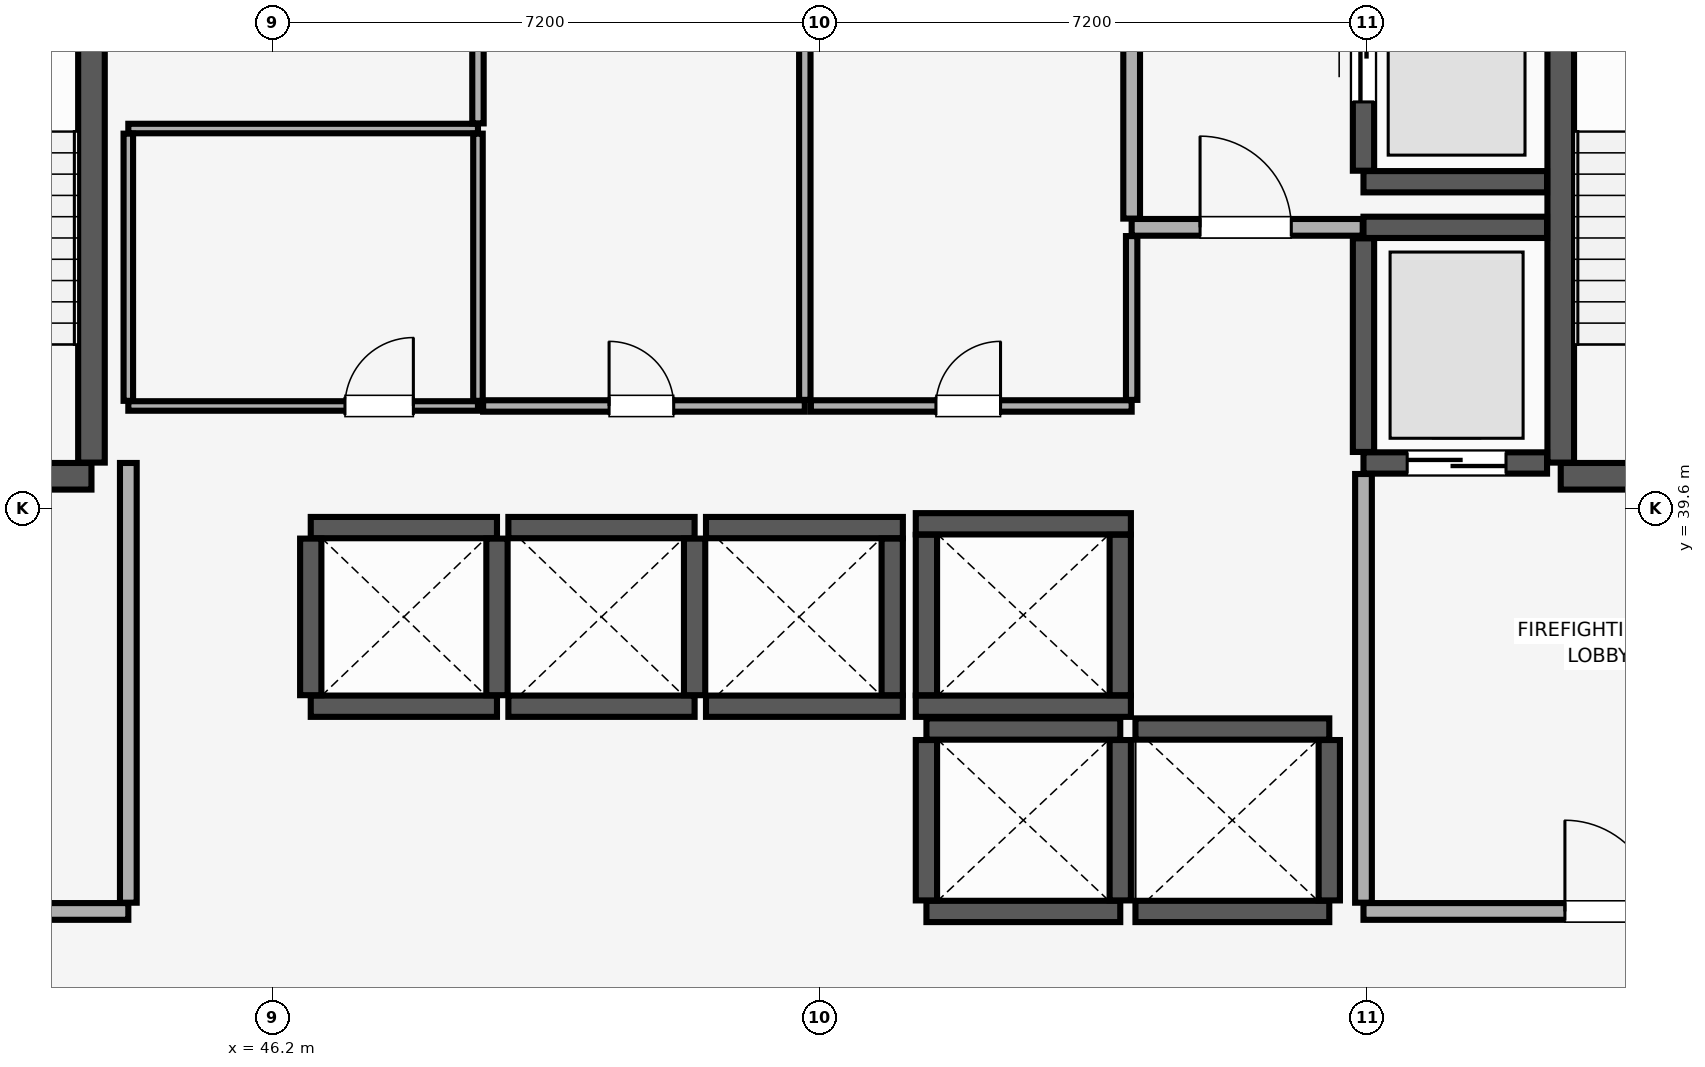
"""IFC4 building model, lengths in metres.
Left out: names, types, materials, properties, quantities, classifications, styles, units other than length and angle.
Written with IfcOpenShell. Run it as: python <this file> out.ifc"""

import sys

from ifc_helpers import new_model, si_unit, direction, frame, frame_2d, origin, place, context, subcontext, project, spatial, rectangle, extrude, element, fill, save


model = new_model("IFC4")
c1 = context("Model", 3, precision=1e-05, world=origin(), true_north=direction((0.0, 1.0)))
c2 = subcontext(c1, "Body", "Model", "MODEL_VIEW")
j1 = project(units=[si_unit("LENGTHUNIT", "METRE"), si_unit("PLANEANGLEUNIT", "RADIAN")], contexts=[c1])
p1 = place(None, origin())
s1 = spatial("IfcSite", under=j1, at=p1, CompositionType="ELEMENT")
p2 = place(p1, origin())
s2 = spatial("IfcBuilding", under=s1, at=p2, CompositionType="ELEMENT")
p3 = place(p2, frame((0.0, 0.0, 76.4)))
s3 = spatial("IfcBuildingStorey", under=s2, at=p3, CompositionType="ELEMENT", Elevation=76.4)
p4 = place(p3, frame((40.185, 40.025, 0.0), z_axis=(0.0, 0.0, 1.0), x_axis=(1.0, 0.0, 0.0)))
e1 = element("IfcWall", 1, at=p4, inside=s3, PredefinedType="SHEAR", context=c2, shape_type="SweptSolid", body=[
    extrude(rectangle(XDim=3.63, YDim=0.35, at=frame_2d((1.815, 0.0))), origin(), (0.0, 0.0, 1.0), 3.4),
])
p5 = place(p4, frame((1.24, 0.0, 0.0)))
e2 = element("IfcOpeningElement", 2, at=p5, cuts=e1, PredefinedType="OPENING", context=c2, shape_type="SweptSolid", body=[
    extrude(rectangle(XDim=1.15, YDim=2.15, at=frame_2d((0.575, 1.075))), frame((0.0, 0.185, 0.0), z_axis=(0.0, -1.0, 0.0), x_axis=(1.0, 0.0, 0.0)), (0.0, 0.0, 1.0), 0.37),
])
p6 = place(p3, frame((43.815, 40.205, 0.0), z_axis=(0.0, 0.0, 1.0), x_axis=(0.0, 1.0, 0.0)))
e3 = element("IfcWall", 3, at=p6, inside=s3, PredefinedType="SHEAR", context=c2, shape_type="SweptSolid", body=[
    extrude(rectangle(XDim=8.09, YDim=0.35, at=frame_2d((4.045, 0.0))), origin(), (0.0, 0.0, 1.0), 3.4),
])
p7 = place(p3, frame((63.145, 40.025, 0.0), z_axis=(0.0, 0.0, 1.0), x_axis=(1.0, 0.0, 0.0)))
e4 = element("IfcWall", 4, at=p7, inside=s3, PredefinedType="SHEAR", context=c2, shape_type="SweptSolid", body=[
    extrude(rectangle(XDim=4.1, YDim=0.35, at=frame_2d((2.05, 0.0))), origin(), (0.0, 0.0, 1.0), 3.4),
])
p8 = place(p7, frame((1.24, 0.0, 0.0)))
e5 = element("IfcOpeningElement", 5, at=p8, cuts=e4, PredefinedType="OPENING", context=c2, shape_type="SweptSolid", body=[
    extrude(rectangle(XDim=1.15, YDim=2.15, at=frame_2d((0.575, 1.075))), frame((0.0, 0.185, 0.0), z_axis=(0.0, -1.0, 0.0), x_axis=(1.0, 0.0, 0.0)), (0.0, 0.0, 1.0), 0.37),
])
p9 = place(p3, frame((63.145, 40.205, 0.0), z_axis=(0.0, 0.0, 1.0), x_axis=(0.0, 1.0, 0.0)))
e6 = element("IfcWall", 6, at=p9, inside=s3, PredefinedType="SHEAR", context=c2, shape_type="SweptSolid", body=[
    extrude(rectangle(XDim=8.09, YDim=0.35, at=frame_2d((4.045, 0.0))), origin(), (0.0, 0.0, 1.0), 3.4),
])
for number, where, z_axis, x_axis in (
    (7, (46.7, 37.0, 0.0), (0.0, 0.0, 1.0), (1.0, 0.0, 0.0)),
    (8, (46.7, 39.35, 0.0), (0.0, 0.0, 1.0), (1.0, 0.0, 0.0)),
):
    element("IfcWall", number, at=place(p3, frame(where, z_axis=z_axis, x_axis=x_axis)), inside=s3, PredefinedType="SHEAR", context=c2, shape_type="SweptSolid", body=[
        extrude(rectangle(XDim=2.45, YDim=0.28, at=frame_2d((1.225, 0.0))), origin(), (0.0, 0.0, 1.0), 3.4),
    ])
for number, where, z_axis, x_axis in (
    (9, (46.7, 37.145, 0.0), (0.0, 0.0, 1.0), (0.0, 1.0, 0.0)),
    (10, (49.15, 37.145, 0.0), (0.0, 0.0, 1.0), (0.0, 1.0, 0.0)),
):
    element("IfcWall", number, at=place(p3, frame(where, z_axis=z_axis, x_axis=x_axis)), inside=s3, PredefinedType="SHEAR", context=c2, shape_type="SweptSolid", body=[
        extrude(rectangle(XDim=2.06, YDim=0.28, at=frame_2d((1.03, 0.0))), origin(), (0.0, 0.0, 1.0), 3.4),
    ])
for number, where, z_axis, x_axis in (
    (11, (49.3, 37.0, 0.0), (0.0, 0.0, 1.0), (1.0, 0.0, 0.0)),
    (12, (49.3, 39.35, 0.0), (0.0, 0.0, 1.0), (1.0, 0.0, 0.0)),
):
    element("IfcWall", number, at=place(p3, frame(where, z_axis=z_axis, x_axis=x_axis)), inside=s3, PredefinedType="SHEAR", context=c2, shape_type="SweptSolid", body=[
        extrude(rectangle(XDim=2.45, YDim=0.28, at=frame_2d((1.225, 0.0))), origin(), (0.0, 0.0, 1.0), 3.4),
    ])
p10 = place(p3, frame((51.75, 37.145, 0.0), z_axis=(0.0, 0.0, 1.0), x_axis=(0.0, 1.0, 0.0)))
e13 = element("IfcWall", 13, at=p10, inside=s3, PredefinedType="SHEAR", context=c2, shape_type="SweptSolid", body=[
    extrude(rectangle(XDim=2.06, YDim=0.28, at=frame_2d((1.03, 0.0))), origin(), (0.0, 0.0, 1.0), 3.4),
])
for number, where, z_axis, x_axis in (
    (14, (51.9, 37.0, 0.0), (0.0, 0.0, 1.0), (1.0, 0.0, 0.0)),
    (15, (51.9, 39.35, 0.0), (0.0, 0.0, 1.0), (1.0, 0.0, 0.0)),
):
    element("IfcWall", number, at=place(p3, frame(where, z_axis=z_axis, x_axis=x_axis)), inside=s3, PredefinedType="SHEAR", context=c2, shape_type="SweptSolid", body=[
        extrude(rectangle(XDim=2.59, YDim=0.28, at=frame_2d((1.295, 0.0))), origin(), (0.0, 0.0, 1.0), 3.4),
    ])
p11 = place(p3, frame((54.35, 37.145, 0.0), z_axis=(0.0, 0.0, 1.0), x_axis=(0.0, 1.0, 0.0)))
e16 = element("IfcWall", 16, at=p11, inside=s3, PredefinedType="SHEAR", context=c2, shape_type="SweptSolid", body=[
    extrude(rectangle(XDim=2.06, YDim=0.28, at=frame_2d((1.03, 0.0))), origin(), (0.0, 0.0, 1.0), 3.4),
])
for number, where, z_axis, x_axis in (
    (17, (54.8, 34.3, 0.0), (0.0, 0.0, 1.0), (1.0, 0.0, 0.0)),
    (18, (54.8, 36.7, 0.0), (0.0, 0.0, 1.0), (1.0, 0.0, 0.0)),
):
    element("IfcWall", number, at=place(p3, frame(where, z_axis=z_axis, x_axis=x_axis)), inside=s3, PredefinedType="SHEAR", context=c2, shape_type="SweptSolid", body=[
        extrude(rectangle(XDim=2.55, YDim=0.28, at=frame_2d((1.275, 0.0))), origin(), (0.0, 0.0, 1.0), 3.4),
    ])
for number, where, z_axis, x_axis in (
    (19, (54.8, 34.445, 0.0), (0.0, 0.0, 1.0), (0.0, 1.0, 0.0)),
    (20, (57.35, 34.445, 0.0), (0.0, 0.0, 1.0), (0.0, 1.0, 0.0)),
):
    element("IfcWall", number, at=place(p3, frame(where, z_axis=z_axis, x_axis=x_axis)), inside=s3, PredefinedType="SHEAR", context=c2, shape_type="SweptSolid", body=[
        extrude(rectangle(XDim=2.11, YDim=0.28, at=frame_2d((1.055, 0.0))), origin(), (0.0, 0.0, 1.0), 3.4),
    ])
for number, where, z_axis, x_axis in (
    (21, (57.55, 34.3, 0.0), (0.0, 0.0, 1.0), (1.0, 0.0, 0.0)),
    (22, (57.55, 36.7, 0.0), (0.0, 0.0, 1.0), (1.0, 0.0, 0.0)),
):
    element("IfcWall", number, at=place(p3, frame(where, z_axis=z_axis, x_axis=x_axis)), inside=s3, PredefinedType="SHEAR", context=c2, shape_type="SweptSolid", body=[
        extrude(rectangle(XDim=2.55, YDim=0.28, at=frame_2d((1.275, 0.0))), origin(), (0.0, 0.0, 1.0), 3.4),
    ])
p12 = place(p3, frame((60.1, 34.445, 0.0), z_axis=(0.0, 0.0, 1.0), x_axis=(0.0, 1.0, 0.0)))
e23 = element("IfcWall", 23, at=p12, inside=s3, PredefinedType="SHEAR", context=c2, shape_type="SweptSolid", body=[
    extrude(rectangle(XDim=2.11, YDim=0.28, at=frame_2d((1.055, 0.0))), origin(), (0.0, 0.0, 1.0), 3.4),
])
for number, where, z_axis, x_axis in (
    (24, (54.66, 37.0, 0.0), (0.0, 0.0, 1.0), (1.0, 0.0, 0.0)),
    (25, (54.66, 39.4, 0.0), (0.0, 0.0, 1.0), (1.0, 0.0, 0.0)),
):
    element("IfcWall", number, at=place(p3, frame(where, z_axis=z_axis, x_axis=x_axis)), inside=s3, PredefinedType="SHEAR", context=c2, shape_type="SweptSolid", body=[
        extrude(rectangle(XDim=2.83, YDim=0.28, at=frame_2d((1.415, 0.0))), origin(), (0.0, 0.0, 1.0), 3.4),
    ])
for number, where, z_axis, x_axis in (
    (26, (54.8, 37.145, 0.0), (0.0, 0.0, 1.0), (0.0, 1.0, 0.0)),
    (27, (57.35, 37.145, 0.0), (0.0, 0.0, 1.0), (0.0, 1.0, 0.0)),
):
    element("IfcWall", number, at=place(p3, frame(where, z_axis=z_axis, x_axis=x_axis)), inside=s3, PredefinedType="SHEAR", context=c2, shape_type="SweptSolid", body=[
        extrude(rectangle(XDim=2.11, YDim=0.28, at=frame_2d((1.055, 0.0))), origin(), (0.0, 0.0, 1.0), 3.4),
    ])
p13 = place(p3, frame((60.55, 40.2, 0.0), z_axis=(0.0, 0.0, 1.0), x_axis=(1.0, 0.0, 0.0)))
e28 = element("IfcWall", 28, at=p13, inside=s3, PredefinedType="SHEAR", context=c2, shape_type="SweptSolid", body=[
    extrude(rectangle(XDim=2.415, YDim=0.28, at=frame_2d((1.208, 0.0))), origin(), (0.0, 0.0, 1.0), 3.4),
])
p14 = place(p13, frame((0.575, 0.0, 0.0)))
e29 = element("IfcOpeningElement", 29, at=p14, cuts=e28, PredefinedType="OPENING", context=c2, shape_type="SweptSolid", body=[
    extrude(rectangle(XDim=1.3, YDim=2.3, at=frame_2d((0.65, 1.15))), frame((0.0, 0.15, 0.0), z_axis=(0.0, -1.0, 0.0), x_axis=(1.0, 0.0, 0.0)), (0.0, 0.0, 1.0), 0.3),
])
p15 = place(p3, frame((60.55, 43.3, 0.0), z_axis=(0.0, 0.0, 1.0), x_axis=(1.0, 0.0, 0.0)))
e30 = element("IfcWall", 30, at=p15, inside=s3, PredefinedType="SHEAR", context=c2, shape_type="SweptSolid", body=[
    extrude(rectangle(XDim=2.415, YDim=0.28, at=frame_2d((1.208, 0.0))), origin(), (0.0, 0.0, 1.0), 3.4),
])
p16 = place(p3, frame((60.55, 40.345, 0.0), z_axis=(0.0, 0.0, 1.0), x_axis=(0.0, 1.0, 0.0)))
e31 = element("IfcWall", 31, at=p16, inside=s3, PredefinedType="SHEAR", context=c2, shape_type="SweptSolid", body=[
    extrude(rectangle(XDim=2.81, YDim=0.28, at=frame_2d((1.405, 0.0))), origin(), (0.0, 0.0, 1.0), 3.4),
])
p17 = place(p3, frame((60.55, 43.9, 0.0), z_axis=(0.0, 0.0, 1.0), x_axis=(1.0, 0.0, 0.0)))
e32 = element("IfcWall", 32, at=p17, inside=s3, PredefinedType="SHEAR", context=c2, shape_type="SweptSolid", body=[
    extrude(rectangle(XDim=2.415, YDim=0.28, at=frame_2d((1.208, 0.0))), origin(), (0.0, 0.0, 1.0), 3.4),
])
p18 = place(p3, frame((60.55, 44.045, 0.0), z_axis=(0.0, 0.0, 1.0), x_axis=(0.0, 1.0, 0.0)))
e33 = element("IfcWall", 33, at=p18, inside=s3, PredefinedType="SHEAR", context=c2, shape_type="SweptSolid", body=[
    extrude(rectangle(XDim=3.11, YDim=0.28, at=frame_2d((1.555, 0.0))), origin(), (0.0, 0.0, 1.0), 3.4),
])
p19 = place(p18, frame((0.905, 0.0, 0.0)))
e34 = element("IfcOpeningElement", 34, at=p19, cuts=e33, PredefinedType="OPENING", context=c2, shape_type="SweptSolid", body=[
    extrude(rectangle(XDim=1.3, YDim=2.3, at=frame_2d((0.65, 1.15))), frame((0.0, 0.15, 0.0), z_axis=(0.0, -1.0, 0.0), x_axis=(1.0, 0.0, 0.0)), (0.0, 0.0, 1.0), 0.3),
])
p20 = place(p3, frame((60.55, 34.3, 0.0), z_axis=(0.0, 0.0, 1.0), x_axis=(1.0, 0.0, 0.0)))
e35 = element("IfcWall", 35, at=p20, inside=s3, PredefinedType="PARTITIONING", context=c2, shape_type="SweptSolid", body=[
    extrude(rectangle(XDim=6.05, YDim=0.22, at=frame_2d((3.025, 0.0))), origin(), (0.0, 0.0, 1.0), 3.4),
])
p21 = place(p20, frame((2.65, 0.0, 0.0)))
e36 = element("IfcOpeningElement", 36, at=p21, cuts=e35, PredefinedType="OPENING", context=c2, shape_type="SweptSolid", body=[
    extrude(rectangle(XDim=1.2, YDim=2.15, at=frame_2d((0.6, 1.075))), frame((0.0, 0.12, 0.0), z_axis=(0.0, -1.0, 0.0), x_axis=(1.0, 0.0, 0.0)), (0.0, 0.0, 1.0), 0.24),
])
p22 = place(p3, frame((60.55, 34.415, 0.0), z_axis=(0.0, 0.0, 1.0), x_axis=(0.0, 1.0, 0.0)))
e37 = element("IfcWall", 37, at=p22, inside=s3, PredefinedType="PARTITIONING", context=c2, shape_type="SweptSolid", body=[
    extrude(rectangle(XDim=5.64, YDim=0.22, at=frame_2d((2.82, 0.0))), origin(), (0.0, 0.0, 1.0), 3.4),
])
p23 = place(p3, frame((39.7, 34.3, 0.0), z_axis=(0.0, 0.0, 1.0), x_axis=(1.0, 0.0, 0.0)))
e38 = element("IfcWall", 38, at=p23, inside=s3, PredefinedType="PARTITIONING", context=c2, shape_type="SweptSolid", body=[
    extrude(rectangle(XDim=4.6, YDim=0.22, at=frame_2d((2.3, 0.0))), origin(), (0.0, 0.0, 1.0), 3.4),
])
p24 = place(p23, frame((1.7, 0.0, 0.0)))
e39 = element("IfcOpeningElement", 39, at=p24, cuts=e38, PredefinedType="OPENING", context=c2, shape_type="SweptSolid", body=[
    extrude(rectangle(XDim=1.2, YDim=2.15, at=frame_2d((0.6, 1.075))), frame((0.0, 0.12, 0.0), z_axis=(0.0, -1.0, 0.0), x_axis=(1.0, 0.0, 0.0)), (0.0, 0.0, 1.0), 0.24),
])
p25 = place(p3, frame((44.3, 34.415, 0.0), z_axis=(0.0, 0.0, 1.0), x_axis=(0.0, 1.0, 0.0)))
e40 = element("IfcWall", 40, at=p25, inside=s3, PredefinedType="PARTITIONING", context=c2, shape_type="SweptSolid", body=[
    extrude(rectangle(XDim=5.785, YDim=0.22, at=frame_2d((2.893, 0.0))), origin(), (0.0, 0.0, 1.0), 3.4),
])
p26 = place(p3, frame((57.5, 43.3, 0.0), z_axis=(0.0, 0.0, 1.0), x_axis=(1.0, 0.0, 0.0)))
e41 = element("IfcWall", 41, at=p26, inside=s3, PredefinedType="PARTITIONING", context=c2, shape_type="SweptSolid", body=[
    extrude(rectangle(XDim=3.04, YDim=0.22, at=frame_2d((1.52, 0.0))), origin(), (0.0, 0.0, 1.0), 3.4),
])
p27 = place(p26, frame((0.9, 0.0, 0.0)))
e42 = element("IfcOpeningElement", 42, at=p27, cuts=e41, PredefinedType="OPENING", context=c2, shape_type="SweptSolid", body=[
    extrude(rectangle(XDim=1.2, YDim=2.15, at=frame_2d((0.6, 1.075))), frame((0.0, 0.12, 0.0), z_axis=(0.0, -1.0, 0.0), x_axis=(1.0, 0.0, 0.0)), (0.0, 0.0, 1.0), 0.24),
])
p28 = place(p3, frame((57.5, 43.415, 0.0), z_axis=(0.0, 0.0, 1.0), x_axis=(0.0, 1.0, 0.0)))
e43 = element("IfcWall", 43, at=p28, inside=s3, PredefinedType="PARTITIONING", context=c2, shape_type="SweptSolid", body=[
    extrude(rectangle(XDim=5.435, YDim=0.22, at=frame_2d((2.718, 0.0))), origin(), (0.0, 0.0, 1.0), 3.4),
])
p29 = place(p3, frame((44.3, 40.95, 0.0), z_axis=(0.0, 0.0, 1.0), x_axis=(1.0, 0.0, 0.0)))
e44 = element("IfcWall", 44, at=p29, inside=s3, PredefinedType="PARTITIONING", context=c2, shape_type="SweptSolid", body=[
    extrude(rectangle(XDim=4.6, YDim=0.125, at=frame_2d((2.3, 0.0))), origin(), (0.0, 0.0, 1.0), 3.4),
])
p30 = place(p29, frame((2.85, 0.0, 0.0)))
e45 = element("IfcOpeningElement", 45, at=p30, cuts=e44, PredefinedType="OPENING", context=c2, shape_type="SweptSolid", body=[
    extrude(rectangle(XDim=0.9, YDim=2.1, at=frame_2d((0.45, 1.05))), frame((0.0, 0.073, 0.0), z_axis=(0.0, -1.0, 0.0), x_axis=(1.0, 0.0, 0.0)), (0.0, 0.0, 1.0), 0.145),
])
p31 = place(p3, frame((44.3, 44.6, 0.0), z_axis=(0.0, 0.0, 1.0), x_axis=(1.0, 0.0, 0.0)))
e46 = element("IfcWall", 46, at=p31, inside=s3, PredefinedType="PARTITIONING", context=c2, shape_type="SweptSolid", body=[
    extrude(rectangle(XDim=4.6, YDim=0.125, at=frame_2d((2.3, 0.0))), origin(), (0.0, 0.0, 1.0), 3.4),
])
for number, where, z_axis, x_axis in (
    (47, (44.3, 41.018, 0.0), (0.0, 0.0, 1.0), (0.0, 1.0, 0.0)),
    (48, (48.9, 41.018, 0.0), (0.0, 0.0, 1.0), (0.0, 1.0, 0.0)),
):
    element("IfcWall", number, at=place(p3, frame(where, z_axis=z_axis, x_axis=x_axis)), inside=s3, PredefinedType="PARTITIONING", context=c2, shape_type="SweptSolid", body=[
        extrude(rectangle(XDim=3.515, YDim=0.125, at=frame_2d((1.757, 0.0))), origin(), (0.0, 0.0, 1.0), 3.4),
    ])
p32 = place(p3, frame((48.968, 40.95, 0.0), z_axis=(0.0, 0.0, 1.0), x_axis=(1.0, 0.0, 0.0)))
e49 = element("IfcWall", 49, at=p32, inside=s3, PredefinedType="PARTITIONING", context=c2, shape_type="SweptSolid", body=[
    extrude(rectangle(XDim=4.232, YDim=0.15, at=frame_2d((2.116, 0.0))), origin(), (0.0, 0.0, 1.0), 3.4),
])
p33 = place(p32, frame((1.657, 0.0, 0.0)))
e50 = element("IfcOpeningElement", 50, at=p33, cuts=e49, PredefinedType="OPENING", context=c2, shape_type="SweptSolid", body=[
    extrude(rectangle(XDim=0.85, YDim=2.1, at=frame_2d((0.425, 1.05))), frame((0.0, 0.085, 0.0), z_axis=(0.0, -1.0, 0.0), x_axis=(1.0, 0.0, 0.0)), (0.0, 0.0, 1.0), 0.17),
])
p34 = place(p3, frame((48.9, 44.667, 0.0), z_axis=(0.0, 0.0, 1.0), x_axis=(0.0, 1.0, 0.0)))
e51 = element("IfcWall", 51, at=p34, inside=s3, PredefinedType="PARTITIONING", context=c2, shape_type="SweptSolid", body=[
    extrude(rectangle(XDim=4.183, YDim=0.15, at=frame_2d((2.091, 0.0))), origin(), (0.0, 0.0, 1.0), 3.4),
])
p35 = place(p3, frame((53.2, 41.03, 0.0), z_axis=(0.0, 0.0, 1.0), x_axis=(0.0, 1.0, 0.0)))
e52 = element("IfcWall", 52, at=p35, inside=s3, PredefinedType="PARTITIONING", context=c2, shape_type="SweptSolid", body=[
    extrude(rectangle(XDim=7.82, YDim=0.15, at=frame_2d((3.91, 0.0))), origin(), (0.0, 0.0, 1.0), 3.4),
])
p36 = place(p3, frame((53.28, 40.95, 0.0), z_axis=(0.0, 0.0, 1.0), x_axis=(1.0, 0.0, 0.0)))
e53 = element("IfcWall", 53, at=p36, inside=s3, PredefinedType="PARTITIONING", context=c2, shape_type="SweptSolid", body=[
    extrude(rectangle(XDim=4.22, YDim=0.15, at=frame_2d((2.11, 0.0))), origin(), (0.0, 0.0, 1.0), 3.4),
])
p37 = place(p36, frame((1.645, 0.0, 0.0)))
e54 = element("IfcOpeningElement", 54, at=p37, cuts=e53, PredefinedType="OPENING", context=c2, shape_type="SweptSolid", body=[
    extrude(rectangle(XDim=0.85, YDim=2.1, at=frame_2d((0.425, 1.05))), frame((0.0, 0.085, 0.0), z_axis=(0.0, -1.0, 0.0), x_axis=(1.0, 0.0, 0.0)), (0.0, 0.0, 1.0), 0.17),
])
p38 = place(p3, frame((57.5, 41.03, 0.0), z_axis=(0.0, 0.0, 1.0), x_axis=(0.0, 1.0, 0.0)))
e55 = element("IfcWall", 55, at=p38, inside=s3, PredefinedType="PARTITIONING", context=c2, shape_type="SweptSolid", body=[
    extrude(rectangle(XDim=2.155, YDim=0.15, at=frame_2d((1.078, 0.0))), origin(), (0.0, 0.0, 1.0), 3.4),
])
p39 = place(p14, origin())
e56 = element("IfcDoor", 56, at=p39, inside=s3, OperationType="DOUBLE_DOOR_SLIDING", PredefinedType="DOOR", context=c2, shape_type="SweptSolid", body=[
    extrude(rectangle(XDim=1.3, YDim=2.3, at=frame_2d((0.65, 1.15))), frame((0.0, 0.025, 0.0), z_axis=(0.0, -1.0, 0.0), x_axis=(1.0, 0.0, 0.0)), (0.0, 0.0, 1.0), 0.05),
])
fill(e29, e56)
p40 = place(p19, origin())
e57 = element("IfcDoor", 57, at=p40, inside=s3, OperationType="DOUBLE_DOOR_SLIDING", PredefinedType="DOOR", context=c2, shape_type="SweptSolid", body=[
    extrude(rectangle(XDim=1.3, YDim=2.3, at=frame_2d((0.65, 1.15))), frame((0.0, 0.025, 0.0), z_axis=(0.0, -1.0, 0.0), x_axis=(1.0, 0.0, 0.0)), (0.0, 0.0, 1.0), 0.05),
])
fill(e34, e57)
p41 = place(p21, origin())
e58 = element("IfcDoor", 58, at=p41, inside=s3, OperationType="SINGLE_SWING_LEFT", PredefinedType="DOOR", context=c2, shape_type="SweptSolid", body=[
    extrude(rectangle(XDim=1.2, YDim=2.15, at=frame_2d((0.6, 1.075))), frame((0.0, 0.025, 0.0), z_axis=(0.0, -1.0, 0.0), x_axis=(1.0, 0.0, 0.0)), (0.0, 0.0, 1.0), 0.05),
])
fill(e36, e58)
p42 = place(p27, origin())
e59 = element("IfcDoor", 59, at=p42, inside=s3, OperationType="SINGLE_SWING_LEFT", PredefinedType="DOOR", context=c2, shape_type="SweptSolid", body=[
    extrude(rectangle(XDim=1.2, YDim=2.15, at=frame_2d((0.6, 1.075))), frame((0.0, 0.025, 0.0), z_axis=(0.0, -1.0, 0.0), x_axis=(1.0, 0.0, 0.0)), (0.0, 0.0, 1.0), 0.05),
])
fill(e42, e59)
p43 = place(p30, origin())
e60 = element("IfcDoor", 60, at=p43, inside=s3, OperationType="SINGLE_SWING_RIGHT", PredefinedType="DOOR", context=c2, shape_type="SweptSolid", body=[
    extrude(rectangle(XDim=0.9, YDim=2.1, at=frame_2d((0.45, 1.05))), frame((0.0, 0.025, 0.0), z_axis=(0.0, -1.0, 0.0), x_axis=(1.0, 0.0, 0.0)), (0.0, 0.0, 1.0), 0.05),
])
fill(e45, e60)
p44 = place(p33, origin())
e61 = element("IfcDoor", 61, at=p44, inside=s3, OperationType="SINGLE_SWING_LEFT", PredefinedType="DOOR", context=c2, shape_type="SweptSolid", body=[
    extrude(rectangle(XDim=0.85, YDim=2.1, at=frame_2d((0.425, 1.05))), frame((0.0, 0.025, 0.0), z_axis=(0.0, -1.0, 0.0), x_axis=(1.0, 0.0, 0.0)), (0.0, 0.0, 1.0), 0.05),
])
fill(e50, e61)
p45 = place(p37, origin())
e62 = element("IfcDoor", 62, at=p45, inside=s3, OperationType="SINGLE_SWING_RIGHT", PredefinedType="DOOR", context=c2, shape_type="SweptSolid", body=[
    extrude(rectangle(XDim=0.85, YDim=2.1, at=frame_2d((0.425, 1.05))), frame((0.0, 0.025, 0.0), z_axis=(0.0, -1.0, 0.0), x_axis=(1.0, 0.0, 0.0)), (0.0, 0.0, 1.0), 0.05),
])
fill(e54, e62)
save(model, sys.argv[1])
